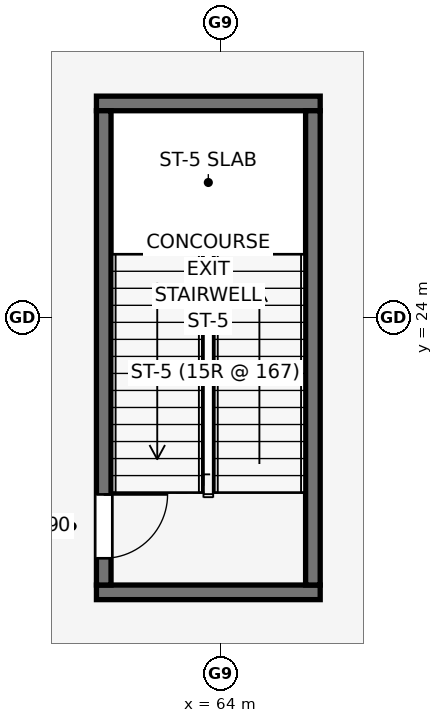
"""IFC4 building model, lengths in metres.
Left out: names, types, materials, properties, quantities, classifications, styles, units other than length and angle.
Written with IfcOpenShell. Run it as: python <this file> out.ifc"""

import sys

from ifc_helpers import new_model, si_unit, direction, frame, frame_2d, origin, place, context, subcontext, project, spatial, rectangle, extrude, element, fill, save


model = new_model("IFC4")
c1 = context("Model", 3, precision=1e-05, world=origin(), true_north=direction((0.0, 1.0)))
c2 = subcontext(c1, "Body", "Model", "MODEL_VIEW")
j1 = project(units=[si_unit("LENGTHUNIT", "METRE"), si_unit("PLANEANGLEUNIT", "RADIAN")], contexts=[c1])
p1 = place(None, origin())
s1 = spatial("IfcSite", under=j1, at=p1, CompositionType="ELEMENT")
p2 = place(p1, origin())
s2 = spatial("IfcBuilding", under=s1, at=p2, CompositionType="ELEMENT")
p3 = place(p2, frame((0.0, 0.0, 6.0)))
s3 = spatial("IfcBuildingStorey", under=s2, at=p3, CompositionType="ELEMENT", Elevation=6.0)
for number, where, z_axis, x_axis in (
    (1, (61.96, 19.48, 0.0), (0.0, 0.0, 1.0), (1.0, 0.0, 0.0)),
    (2, (65.64, 27.52, 0.0), (0.0, 0.0, 1.0), (-1.0, 0.0, 0.0)),
):
    element("IfcWall", number, at=place(p3, frame(where, z_axis=z_axis, x_axis=x_axis)), inside=s3, PredefinedType="SHEAR", context=c2, shape_type="SweptSolid", body=[
        extrude(rectangle(XDim=3.68, YDim=0.24, at=frame_2d((1.84, 0.0))), origin(), (0.0, 0.0, 1.0), 5.0),
    ])
p4 = place(p3, frame((62.08, 27.4, 0.0), z_axis=(0.0, 0.0, 1.0), x_axis=(0.0, -1.0, 0.0)))
e3 = element("IfcWall", 3, at=p4, inside=s3, PredefinedType="SHEAR", context=c2, shape_type="SweptSolid", body=[
    extrude(rectangle(XDim=7.8, YDim=0.24, at=frame_2d((3.9, 0.0))), origin(), (0.0, 0.0, 1.0), 5.0),
])
p5 = place(p4, frame((6.31, 0.0, 0.0)))
e4 = element("IfcOpeningElement", 4, at=p5, cuts=e3, PredefinedType="OPENING", context=c2, shape_type="SweptSolid", body=[
    extrude(rectangle(XDim=1.05, YDim=2.0, at=frame_2d((0.525, 1.0))), frame((0.0, 0.13, 0.0), z_axis=(0.0, -1.0, 0.0), x_axis=(1.0, 0.0, 0.0)), (0.0, 0.0, 1.0), 0.26),
])
p6 = place(p3, frame((65.52, 19.6, 0.0), z_axis=(0.0, 0.0, 1.0), x_axis=(0.0, 1.0, 0.0)))
e5 = element("IfcWall", 5, at=p6, inside=s3, PredefinedType="SHEAR", context=c2, shape_type="SweptSolid", body=[
    extrude(rectangle(XDim=7.8, YDim=0.24, at=frame_2d((3.9, 0.0))), origin(), (0.0, 0.0, 1.0), 5.0),
])
p7 = place(p5, origin())
e6 = element("IfcDoor", 6, at=p7, inside=s3, OperationType="SINGLE_SWING_LEFT", PredefinedType="DOOR", context=c2, shape_type="SweptSolid", body=[
    extrude(rectangle(XDim=1.05, YDim=2.0, at=frame_2d((0.525, 1.0))), frame((0.0, 0.025, 0.0), z_axis=(0.0, -1.0, 0.0), x_axis=(1.0, 0.0, 0.0)), (0.0, 0.0, 1.0), 0.05),
])
fill(e4, e6)
save(model, sys.argv[1])
